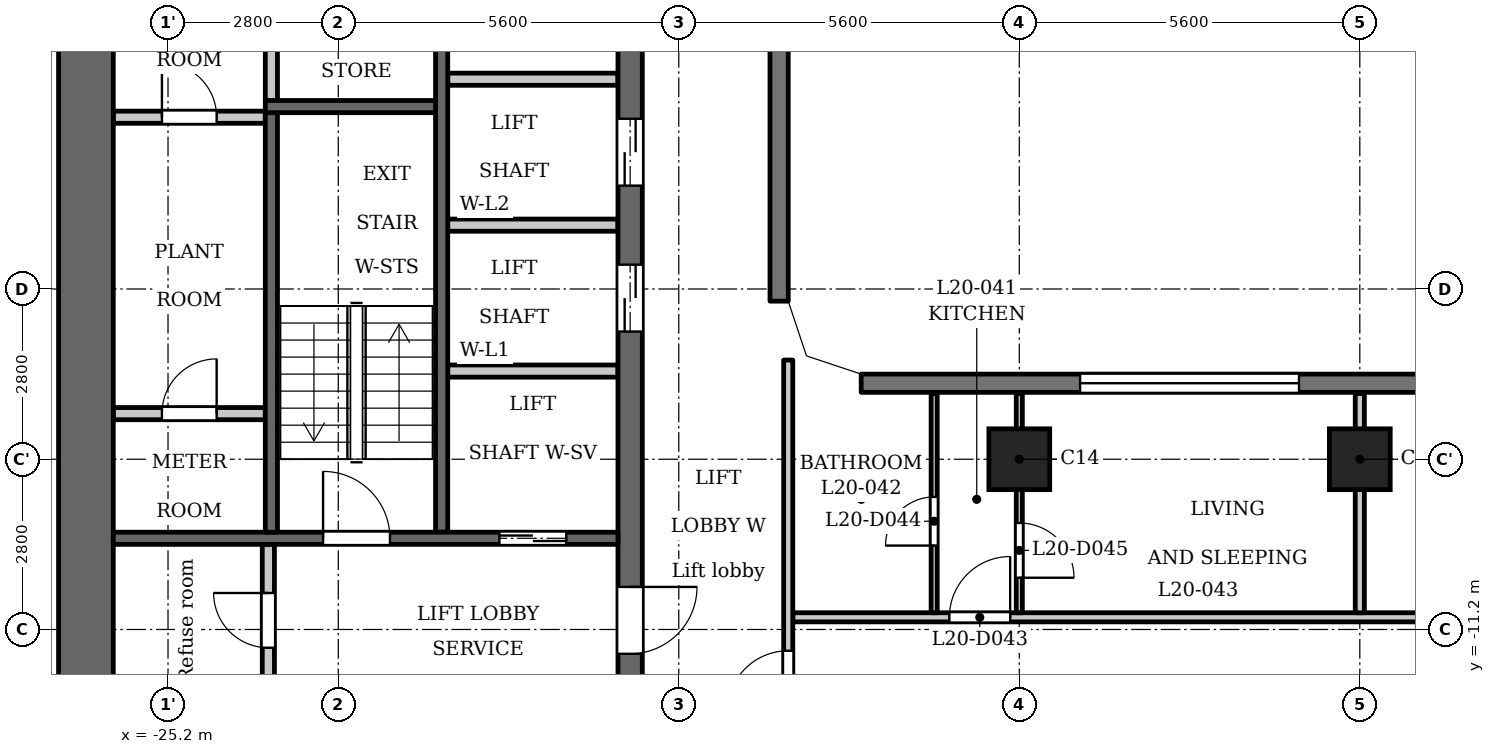
"""IFC4 building model, lengths in metres.
Left out: names, types, materials, properties, quantities, classifications, styles, units other than length and angle.
Written with IfcOpenShell. Run it as: python <this file> out.ifc"""

import sys

from ifc_helpers import new_model, si_unit, direction, frame, frame_2d, origin, origin_2d, place, context, subcontext, project, spatial, polyline, rectangle, outline, extrude, element, fill, save


model = new_model("IFC4")
c1 = context("Model", 3, precision=1e-05, world=origin(), true_north=direction((0.0, 1.0)))
c2 = subcontext(c1, "Body", "Model", "MODEL_VIEW")
j1 = project(units=[si_unit("LENGTHUNIT", "METRE"), si_unit("PLANEANGLEUNIT", "RADIAN")], contexts=[c1])
p1 = place(None, origin())
s1 = spatial("IfcSite", under=j1, at=p1, CompositionType="ELEMENT")
p2 = place(p1, origin())
s2 = spatial("IfcBuilding", under=s1, at=p2, CompositionType="ELEMENT")
p3 = place(p2, frame((0.0, 0.0, 83.3)))
s3 = spatial("IfcBuildingStorey", under=s2, at=p3, CompositionType="ELEMENT", Elevation=83.3)
for number, where, z_axis, x_axis in (
    (1, (-11.2, -8.4, 0.0), (0.0, 0.0, 1.0), (1.0, 0.0, 0.0)),
    (2, (-5.6, -8.4, 0.0), (0.0, 0.0, 1.0), (1.0, 0.0, 0.0)),
):
    element("IfcColumn", number, at=place(p3, frame(where, z_axis=z_axis, x_axis=x_axis)), inside=s3, PredefinedType="COLUMN", context=c2, shape_type="SweptSolid", body=[
        extrude(rectangle(XDim=1.0, YDim=1.0, at=origin_2d()), origin(), (0.0, 0.0, 1.0), 3.5),
    ])
p4 = place(p3, frame((-15.15, -5.8, 0.0), z_axis=(0.0, 0.0, 1.0), x_axis=(0.0, 1.0, 0.0)))
e3 = element("IfcWall", 3, at=p4, inside=s3, PredefinedType="SOLIDWALL", context=c2, shape_type="SweptSolid", body=[
    extrude(rectangle(XDim=11.6, YDim=0.3, at=frame_2d((5.8, 0.0))), origin(), (0.0, 0.0, 1.0), 3.2),
])
p5 = place(p3, frame((13.8, -7.15, 0.0), z_axis=(0.0, 0.0, 1.0), x_axis=(-1.0, 0.0, 0.0)))
e4 = element("IfcWall", 4, at=p5, inside=s3, PredefinedType="SOLIDWALL", context=c2, shape_type="SweptSolid", body=[
    extrude(rectangle(XDim=27.6, YDim=0.3, at=frame_2d((13.8, 0.0))), origin(), (0.0, 0.0, 1.0), 3.2),
])
p6 = place(p5, frame((3.6, 0.0, 1.2)))
e5 = element("IfcOpeningElement", 5, at=p6, cuts=e4, PredefinedType="OPENING", context=c2, shape_type="SweptSolid", body=[
    extrude(rectangle(XDim=3.6, YDim=0.95, at=frame_2d((1.8, 0.475))), frame((0.0, 0.16, 0.0), z_axis=(0.0, -1.0, 0.0), x_axis=(1.0, 0.0, 0.0)), (0.0, 0.0, 1.0), 0.32),
])
p7 = place(p5, frame((8.8, 0.0, 0.6)))
e6 = element("IfcOpeningElement", 6, at=p7, cuts=e4, PredefinedType="OPENING", context=c2, shape_type="SweptSolid", body=[
    extrude(rectangle(XDim=1.2, YDim=1.55, at=frame_2d((0.6, 0.775))), frame((0.0, 0.16, 0.0), z_axis=(0.0, -1.0, 0.0), x_axis=(1.0, 0.0, 0.0)), (0.0, 0.0, 1.0), 0.32),
])
p8 = place(p5, frame((11.3, 0.0, 0.9)))
e7 = element("IfcOpeningElement", 7, at=p8, cuts=e4, PredefinedType="OPENING", context=c2, shape_type="SweptSolid", body=[
    extrude(rectangle(XDim=1.8, YDim=1.25, at=frame_2d((0.9, 0.625))), frame((0.0, 0.16, 0.0), z_axis=(0.0, -1.0, 0.0), x_axis=(1.0, 0.0, 0.0)), (0.0, 0.0, 1.0), 0.32),
])
p9 = place(p5, frame((14.8, 0.0, 1.2)))
e8 = element("IfcOpeningElement", 8, at=p9, cuts=e4, PredefinedType="OPENING", context=c2, shape_type="SweptSolid", body=[
    extrude(rectangle(XDim=3.6, YDim=0.95, at=frame_2d((1.8, 0.475))), frame((0.0, 0.16, 0.0), z_axis=(0.0, -1.0, 0.0), x_axis=(1.0, 0.0, 0.0)), (0.0, 0.0, 1.0), 0.32),
])
p10 = place(p5, frame((20.4, 0.0, 1.2)))
e9 = element("IfcOpeningElement", 9, at=p10, cuts=e4, PredefinedType="OPENING", context=c2, shape_type="SweptSolid", body=[
    extrude(rectangle(XDim=3.6, YDim=0.95, at=frame_2d((1.8, 0.475))), frame((0.0, 0.16, 0.0), z_axis=(0.0, -1.0, 0.0), x_axis=(1.0, 0.0, 0.0)), (0.0, 0.0, 1.0), 0.32),
])
p11 = place(p3, frame((-23.5, -2.5, 0.0), z_axis=(0.0, 0.0, 1.0), x_axis=(0.0, 1.0, 0.0)))
e10 = element("IfcWall", 10, at=p11, inside=s3, PredefinedType="PARTITIONING", context=c2, shape_type="SweptSolid", body=[
    extrude(rectangle(XDim=2.65, YDim=0.2, at=frame_2d((1.325, 0.0))), origin(), (0.0, 0.0, 1.0), 3.2),
])
p12 = place(p3, frame((-20.7, -9.6, 0.0), z_axis=(0.0, 0.0, 1.0), x_axis=(0.0, 1.0, 0.0)))
e11 = element("IfcWall", 11, at=p12, inside=s3, PredefinedType="SHEAR", context=c2, shape_type="SweptSolid", body=[
    extrude(rectangle(XDim=9.75, YDim=0.2, at=frame_2d((4.875, 0.0))), origin(), (0.0, 0.0, 1.0), 3.2),
])
p13 = place(p3, frame((-17.6, -12.3, 0.0), z_axis=(0.0, 0.0, 1.0), x_axis=(0.0, 1.0, 0.0)))
e12 = element("IfcWall", 12, at=p13, inside=s3, PredefinedType="SHEAR", context=c2, shape_type="SweptSolid", body=[
    extrude(rectangle(XDim=24.6, YDim=0.4, at=frame_2d((12.3, 0.0))), origin(), (0.0, 0.0, 1.0), 3.2),
])
p14 = place(p13, frame((6.0, 0.0, 0.0)))
e13 = element("IfcOpeningElement", 13, at=p14, cuts=e12, PredefinedType="OPENING", context=c2, shape_type="SweptSolid", body=[
    extrude(rectangle(XDim=1.1, YDim=2.1, at=frame_2d((0.55, 1.05))), frame((0.0, 0.21, 0.0), z_axis=(0.0, -1.0, 0.0), x_axis=(1.0, 0.0, 0.0)), (0.0, 0.0, 1.0), 0.42),
])
p15 = place(p13, frame((8.4, 0.0, 0.0)))
e14 = element("IfcOpeningElement", 14, at=p15, cuts=e12, PredefinedType="OPENING", context=c2, shape_type="SweptSolid", body=[
    extrude(rectangle(XDim=1.1, YDim=2.1, at=frame_2d((0.55, 1.05))), frame((0.0, 0.21, 0.0), z_axis=(0.0, -1.0, 0.0), x_axis=(1.0, 0.0, 0.0)), (0.0, 0.0, 1.0), 0.42),
])
p16 = place(p13, frame((10.8, 0.0, 0.0)))
e15 = element("IfcOpeningElement", 15, at=p16, cuts=e12, PredefinedType="OPENING", context=c2, shape_type="SweptSolid", body=[
    extrude(rectangle(XDim=1.1, YDim=2.1, at=frame_2d((0.55, 1.05))), frame((0.0, 0.21, 0.0), z_axis=(0.0, -1.0, 0.0), x_axis=(1.0, 0.0, 0.0)), (0.0, 0.0, 1.0), 0.42),
])
p17 = place(p13, frame((16.75, 0.0, 0.0)))
e16 = element("IfcOpeningElement", 16, at=p17, cuts=e12, PredefinedType="OPENING", context=c2, shape_type="SweptSolid", body=[
    extrude(rectangle(XDim=0.9, YDim=2.1, at=frame_2d((0.45, 1.05))), frame((0.0, 0.21, 0.0), z_axis=(0.0, -1.0, 0.0), x_axis=(1.0, 0.0, 0.0)), (0.0, 0.0, 1.0), 0.42),
])
p18 = place(p13, frame((22.8, 0.0, 0.0)))
e17 = element("IfcOpeningElement", 17, at=p18, cuts=e12, PredefinedType="OPENING", context=c2, shape_type="SweptSolid", body=[
    extrude(rectangle(XDim=1.1, YDim=2.1, at=frame_2d((0.55, 1.05))), frame((0.0, 0.21, 0.0), z_axis=(0.0, -1.0, 0.0), x_axis=(1.0, 0.0, 0.0)), (0.0, 0.0, 1.0), 0.42),
])
p19 = place(p13, frame((0.7, 0.0, 0.0)))
e18 = element("IfcOpeningElement", 18, at=p19, cuts=e12, PredefinedType="OPENING", context=c2, shape_type="SweptSolid", body=[
    extrude(rectangle(XDim=1.1, YDim=2.1, at=frame_2d((0.55, 1.05))), frame((0.0, 0.21, 0.0), z_axis=(0.0, -1.0, 0.0), x_axis=(1.0, 0.0, 0.0)), (0.0, 0.0, 1.0), 0.42),
])
p20 = place(p13, frame((12.775, 0.0, 0.0)))
e19 = element("IfcOpeningElement", 19, at=p20, cuts=e12, PredefinedType="OPENING", context=c2, shape_type="SweptSolid", body=[
    extrude(rectangle(XDim=1.8, YDim=2.1, at=frame_2d((0.9, 1.05))), frame((0.0, 0.21, 0.0), z_axis=(0.0, -1.0, 0.0), x_axis=(1.0, 0.0, 0.0)), (0.0, 0.0, 1.0), 0.42),
])
p21 = place(p3, frame((-26.55, -12.3, 0.0), z_axis=(0.0, 0.0, 1.0), x_axis=(0.0, 1.0, 0.0)))
e20 = element("IfcWall", 20, at=p21, inside=s3, PredefinedType="SHEAR", context=c2, shape_type="SweptSolid", body=[
    extrude(rectangle(XDim=24.6, YDim=0.9, at=frame_2d((12.3, 0.0))), origin(), (0.0, 0.0, 1.0), 3.2),
])
p22 = place(p3, frame((-23.55, -12.3, 0.0), z_axis=(0.0, 0.0, 1.0), x_axis=(0.0, 1.0, 0.0)))
e21 = element("IfcWall", 21, at=p22, inside=s3, PredefinedType="PARTITIONING", context=c2, shape_type="SweptSolid", body=[
    extrude(rectangle(XDim=2.5, YDim=0.2, at=frame_2d((1.25, 0.0))), origin(), (0.0, 0.0, 1.0), 3.2),
])
p23 = place(p22, frame((0.8, 0.0, 0.0)))
e22 = element("IfcOpeningElement", 22, at=p23, cuts=e21, PredefinedType="OPENING", context=c2, shape_type="SweptSolid", body=[
    extrude(rectangle(XDim=0.9, YDim=2.1, at=frame_2d((0.45, 1.05))), frame((0.0, 0.11, 0.0), z_axis=(0.0, -1.0, 0.0), x_axis=(1.0, 0.0, 0.0)), (0.0, 0.0, 1.0), 0.22),
])
p24 = place(p3, frame((-23.6, -7.65, 0.0), z_axis=(0.0, 0.0, 1.0), x_axis=(-1.0, 0.0, 0.0)))
e23 = element("IfcWall", 23, at=p24, inside=s3, PredefinedType="PARTITIONING", context=c2, shape_type="SweptSolid", body=[
    extrude(rectangle(XDim=2.5, YDim=0.2, at=frame_2d((1.25, 0.0))), origin(), (0.0, 0.0, 1.0), 3.2),
])
p25 = place(p24, frame((0.8, 0.0, 0.0)))
e24 = element("IfcOpeningElement", 24, at=p25, cuts=e23, PredefinedType="OPENING", context=c2, shape_type="SweptSolid", body=[
    extrude(rectangle(XDim=0.9, YDim=2.1, at=frame_2d((0.45, 1.05))), frame((0.0, 0.11, 0.0), z_axis=(0.0, -1.0, 0.0), x_axis=(1.0, 0.0, 0.0)), (0.0, 0.0, 1.0), 0.22),
])
p26 = place(p3, frame((-23.6, -2.775, 0.0), z_axis=(0.0, 0.0, 1.0), x_axis=(-1.0, 0.0, 0.0)))
e25 = element("IfcWall", 25, at=p26, inside=s3, PredefinedType="PARTITIONING", context=c2, shape_type="SweptSolid", body=[
    extrude(rectangle(XDim=2.5, YDim=0.2, at=frame_2d((1.25, 0.0))), origin(), (0.0, 0.0, 1.0), 3.2),
])
p27 = place(p26, frame((0.8, 0.0, 0.0)))
e26 = element("IfcOpeningElement", 26, at=p27, cuts=e25, PredefinedType="OPENING", context=c2, shape_type="SweptSolid", body=[
    extrude(rectangle(XDim=0.9, YDim=2.1, at=frame_2d((0.45, 1.05))), frame((0.0, 0.11, 0.0), z_axis=(0.0, -1.0, 0.0), x_axis=(1.0, 0.0, 0.0)), (0.0, 0.0, 1.0), 0.22),
])
p28 = place(p3, frame((-17.8, -9.7, 0.0), z_axis=(0.0, 0.0, 1.0), x_axis=(-1.0, 0.0, 0.0)))
e27 = element("IfcWall", 27, at=p28, inside=s3, PredefinedType="SHEAR", context=c2, shape_type="SweptSolid", body=[
    extrude(rectangle(XDim=8.3, YDim=0.2, at=frame_2d((4.15, 0.0))), origin(), (0.0, 0.0, 1.0), 3.2),
])
p29 = place(p28, frame((0.85, 0.0, 0.0)))
e28 = element("IfcOpeningElement", 28, at=p29, cuts=e27, PredefinedType="OPENING", context=c2, shape_type="SweptSolid", body=[
    extrude(rectangle(XDim=1.1, YDim=2.1, at=frame_2d((0.55, 1.05))), frame((0.0, 0.11, 0.0), z_axis=(0.0, -1.0, 0.0), x_axis=(1.0, 0.0, 0.0)), (0.0, 0.0, 1.0), 0.22),
])
p30 = place(p28, frame((3.75, 0.0, 0.0)))
e29 = element("IfcOpeningElement", 29, at=p30, cuts=e27, PredefinedType="OPENING", context=c2, shape_type="SweptSolid", body=[
    extrude(rectangle(XDim=1.1, YDim=2.1, at=frame_2d((0.55, 1.05))), frame((0.0, 0.11, 0.0), z_axis=(0.0, -1.0, 0.0), x_axis=(1.0, 0.0, 0.0)), (0.0, 0.0, 1.0), 0.22),
])
for number, where, z_axis, x_axis in (
    (30, (-17.8, -6.95, 0.0), (0.0, 0.0, 1.0), (-1.0, 0.0, 0.0)),
    (31, (-17.8, -4.55, 0.0), (0.0, 0.0, 1.0), (-1.0, 0.0, 0.0)),
    (32, (-17.8, -2.15, 0.0), (0.0, 0.0, 1.0), (-1.0, 0.0, 0.0)),
):
    element("IfcWall", number, at=place(p3, frame(where, z_axis=z_axis, x_axis=x_axis)), inside=s3, PredefinedType="PARTITIONING", context=c2, shape_type="SweptSolid", body=[
        extrude(rectangle(XDim=2.8, YDim=0.2, at=frame_2d((1.4, 0.0))), origin(), (0.0, 0.0, 1.0), 3.2),
    ])
p31 = place(p3, frame((-23.5, -9.6, 0.0), z_axis=(0.0, 0.0, 1.0), x_axis=(0.0, 1.0, 0.0)))
e33 = element("IfcWall", 33, at=p31, inside=s3, PredefinedType="SHEAR", context=c2, shape_type="SweptSolid", body=[
    extrude(rectangle(XDim=6.9, YDim=0.2, at=frame_2d((3.45, 0.0))), origin(), (0.0, 0.0, 1.0), 3.2),
])
p32 = place(p3, frame((-20.8, -2.6, 0.0), z_axis=(0.0, 0.0, 1.0), x_axis=(-1.0, 0.0, 0.0)))
e34 = element("IfcWall", 34, at=p32, inside=s3, PredefinedType="SHEAR", context=c2, shape_type="SweptSolid", body=[
    extrude(rectangle(XDim=2.8, YDim=0.2, at=frame_2d((1.4, 0.0))), origin(), (0.0, 0.0, 1.0), 3.2),
])
p33 = place(p3, frame((-14.925, -11.0, 0.0), z_axis=(0.0, 0.0, 1.0), x_axis=(1.0, 0.0, 0.0)))
e35 = element("IfcWall", 35, at=p33, inside=s3, PredefinedType="PARTITIONING", context=c2, shape_type="SweptSolid", body=[
    extrude(rectangle(XDim=29.85, YDim=0.15, at=frame_2d((14.925, 0.0))), origin(), (0.0, 0.0, 1.0), 3.2),
])
p34 = place(p33, frame((2.575, 0.0, 0.0)))
e36 = element("IfcOpeningElement", 36, at=p34, cuts=e35, PredefinedType="OPENING", context=c2, shape_type="SweptSolid", body=[
    extrude(rectangle(XDim=1.0, YDim=2.1, at=frame_2d((0.5, 1.05))), frame((0.0, 0.085, 0.0), z_axis=(0.0, -1.0, 0.0), x_axis=(1.0, 0.0, 0.0)), (0.0, 0.0, 1.0), 0.17),
])
p35 = place(p33, frame((15.475, 0.0, 0.0)))
e37 = element("IfcOpeningElement", 37, at=p35, cuts=e35, PredefinedType="OPENING", context=c2, shape_type="SweptSolid", body=[
    extrude(rectangle(XDim=1.0, YDim=2.1, at=frame_2d((0.5, 1.05))), frame((0.0, 0.085, 0.0), z_axis=(0.0, -1.0, 0.0), x_axis=(1.0, 0.0, 0.0)), (0.0, 0.0, 1.0), 0.17),
])
p36 = place(p33, frame((26.375, 0.0, 0.0)))
e38 = element("IfcOpeningElement", 38, at=p36, cuts=e35, PredefinedType="OPENING", context=c2, shape_type="SweptSolid", body=[
    extrude(rectangle(XDim=1.0, YDim=2.1, at=frame_2d((0.5, 1.05))), frame((0.0, 0.085, 0.0), z_axis=(0.0, -1.0, 0.0), x_axis=(1.0, 0.0, 0.0)), (0.0, 0.0, 1.0), 0.17),
])
p37 = place(p3, frame((-15.0, -13.125, 0.0), z_axis=(0.0, 0.0, 1.0), x_axis=(0.0, 1.0, 0.0)))
e39 = element("IfcWall", 39, at=p37, inside=s3, PredefinedType="PARTITIONING", context=c2, shape_type="SweptSolid", body=[
    extrude(rectangle(XDim=6.356, YDim=0.15, at=frame_2d((3.178, 0.0))), origin(), (0.0, 0.0, 1.0), 3.2),
])
p38 = place(p37, frame((0.575, 0.0, 0.0)))
e40 = element("IfcOpeningElement", 40, at=p38, cuts=e39, PredefinedType="OPENING", context=c2, shape_type="SweptSolid", body=[
    extrude(rectangle(XDim=1.0, YDim=2.1, at=frame_2d((0.5, 1.05))), frame((0.0, 0.085, 0.0), z_axis=(0.0, -1.0, 0.0), x_axis=(1.0, 0.0, 0.0)), (0.0, 0.0, 1.0), 0.17),
])
p39 = place(p3, frame((-12.6, -10.925, 0.0), z_axis=(0.0, 0.0, 1.0), x_axis=(0.0, 1.0, 0.0)))
e41 = element("IfcWall", 41, at=p39, inside=s3, PredefinedType="PARTITIONING", context=c2, shape_type="SweptSolid", body=[
    extrude(rectangle(XDim=3.605, YDim=0.1, at=frame_2d((1.802, 0.0))), origin(), (0.0, 0.0, 1.0), 3.2),
])
p40 = place(p39, frame((1.105, 0.0, 0.0)))
e42 = element("IfcOpeningElement", 42, at=p40, cuts=e41, PredefinedType="OPENING", context=c2, shape_type="SweptSolid", body=[
    extrude(rectangle(XDim=0.8, YDim=2.1, at=frame_2d((0.4, 1.05))), frame((0.0, 0.06, 0.0), z_axis=(0.0, -1.0, 0.0), x_axis=(1.0, 0.0, 0.0)), (0.0, 0.0, 1.0), 0.12),
])
p41 = place(p3, frame((-11.2, -10.925, 0.0), z_axis=(0.0, 0.0, 1.0), x_axis=(0.0, 1.0, 0.0)))
e43 = element("IfcWall", 43, at=p41, inside=s3, PredefinedType="PARTITIONING", context=c2, shape_type="SweptSolid", body=[
    extrude(rectangle(XDim=3.605, YDim=0.1, at=frame_2d((1.802, 0.0))), origin(), (0.0, 0.0, 1.0), 3.2),
])
p42 = place(p41, frame((0.576, 0.0, 0.0)))
e44 = element("IfcOpeningElement", 44, at=p42, cuts=e43, PredefinedType="OPENING", context=c2, shape_type="SweptSolid", body=[
    extrude(rectangle(XDim=0.9, YDim=2.1, at=frame_2d((0.45, 1.05))), frame((0.0, 0.06, 0.0), z_axis=(0.0, -1.0, 0.0), x_axis=(1.0, 0.0, 0.0)), (0.0, 0.0, 1.0), 0.12),
])
p43 = place(p3, frame((-5.6, -10.925, 0.0), z_axis=(0.0, 0.0, 1.0), x_axis=(0.0, 1.0, 0.0)))
e45 = element("IfcWall", 45, at=p43, inside=s3, PredefinedType="PARTITIONING", context=c2, shape_type="SweptSolid", body=[
    extrude(rectangle(XDim=3.605, YDim=0.15, at=frame_2d((1.802, 0.0))), origin(), (0.0, 0.0, 1.0), 3.2),
])
p44 = place(p3, origin())
e46 = element("IfcWall", 46, at=p44, inside=s3, PredefinedType="SOLIDWALL", context=c2, shape_type="SweptSolid", body=[
    extrude(outline(polyline([(-14.937, -6.937), (-13.849, -7.3), (-13.8, -7.3), (-13.8, -7.0), (-14.7, -6.7), (-15.0, -5.8), (-15.3, -5.8), (-15.3, -5.849), (-14.937, -6.937)])), origin(), (0.0, 0.0, 1.0), 3.2),
])
p45 = place(p29, origin())
e47 = element("IfcDoor", 47, at=p45, inside=s3, OperationType="DOUBLE_DOOR_SLIDING", PredefinedType="DOOR", context=c2, shape_type="SweptSolid", body=[
    extrude(rectangle(XDim=1.1, YDim=2.1, at=frame_2d((0.55, 1.05))), frame((0.0, 0.025, 0.0), z_axis=(0.0, -1.0, 0.0), x_axis=(1.0, 0.0, 0.0)), (0.0, 0.0, 1.0), 0.05),
])
fill(e28, e47)
p46 = place(p14, origin())
e48 = element("IfcDoor", 48, at=p46, inside=s3, OperationType="DOUBLE_DOOR_SLIDING", PredefinedType="DOOR", context=c2, shape_type="SweptSolid", body=[
    extrude(rectangle(XDim=1.1, YDim=2.1, at=frame_2d((0.55, 1.05))), frame((0.0, 0.025, 0.0), z_axis=(0.0, -1.0, 0.0), x_axis=(1.0, 0.0, 0.0)), (0.0, 0.0, 1.0), 0.05),
])
fill(e13, e48)
p47 = place(p15, origin())
e49 = element("IfcDoor", 49, at=p47, inside=s3, OperationType="DOUBLE_DOOR_SLIDING", PredefinedType="DOOR", context=c2, shape_type="SweptSolid", body=[
    extrude(rectangle(XDim=1.1, YDim=2.1, at=frame_2d((0.55, 1.05))), frame((0.0, 0.025, 0.0), z_axis=(0.0, -1.0, 0.0), x_axis=(1.0, 0.0, 0.0)), (0.0, 0.0, 1.0), 0.05),
])
fill(e14, e49)
p48 = place(p19, origin())
e50 = element("IfcDoor", 50, at=p48, inside=s3, OperationType="SINGLE_SWING_RIGHT", PredefinedType="DOOR", context=c2, shape_type="SweptSolid", body=[
    extrude(rectangle(XDim=1.1, YDim=2.1, at=frame_2d((0.55, 1.05))), frame((0.0, 0.025, 0.0), z_axis=(0.0, -1.0, 0.0), x_axis=(1.0, 0.0, 0.0)), (0.0, 0.0, 1.0), 0.05),
])
fill(e18, e50)
p49 = place(p23, origin())
e51 = element("IfcDoor", 51, at=p49, inside=s3, OperationType="SINGLE_SWING_LEFT", PredefinedType="DOOR", context=c2, shape_type="SweptSolid", body=[
    extrude(rectangle(XDim=0.9, YDim=2.1, at=frame_2d((0.45, 1.05))), frame((0.0, 0.025, 0.0), z_axis=(0.0, -1.0, 0.0), x_axis=(1.0, 0.0, 0.0)), (0.0, 0.0, 1.0), 0.05),
])
fill(e22, e51)
p50 = place(p30, origin())
e52 = element("IfcDoor", 52, at=p50, inside=s3, OperationType="SINGLE_SWING_RIGHT", PredefinedType="DOOR", context=c2, shape_type="SweptSolid", body=[
    extrude(rectangle(XDim=1.1, YDim=2.1, at=frame_2d((0.55, 1.05))), frame((0.0, 0.025, 0.0), z_axis=(0.0, -1.0, 0.0), x_axis=(1.0, 0.0, 0.0)), (0.0, 0.0, 1.0), 0.05),
])
fill(e29, e52)
p51 = place(p25, origin())
e53 = element("IfcDoor", 53, at=p51, inside=s3, OperationType="SINGLE_SWING_LEFT", PredefinedType="DOOR", context=c2, shape_type="SweptSolid", body=[
    extrude(rectangle(XDim=0.9, YDim=2.1, at=frame_2d((0.45, 1.05))), frame((0.0, 0.025, 0.0), z_axis=(0.0, -1.0, 0.0), x_axis=(1.0, 0.0, 0.0)), (0.0, 0.0, 1.0), 0.05),
])
fill(e24, e53)
p52 = place(p27, origin())
e54 = element("IfcDoor", 54, at=p52, inside=s3, OperationType="SINGLE_SWING_RIGHT", PredefinedType="DOOR", context=c2, shape_type="SweptSolid", body=[
    extrude(rectangle(XDim=0.9, YDim=2.1, at=frame_2d((0.45, 1.05))), frame((0.0, 0.025, 0.0), z_axis=(0.0, -1.0, 0.0), x_axis=(1.0, 0.0, 0.0)), (0.0, 0.0, 1.0), 0.05),
])
fill(e26, e54)
p53 = place(p38, origin())
e55 = element("IfcDoor", 55, at=p53, inside=s3, OperationType="SINGLE_SWING_RIGHT", PredefinedType="DOOR", context=c2, shape_type="SweptSolid", body=[
    extrude(rectangle(XDim=1.0, YDim=2.1, at=frame_2d((0.5, 1.05))), frame((0.0, 0.025, 0.0), z_axis=(0.0, -1.0, 0.0), x_axis=(1.0, 0.0, 0.0)), (0.0, 0.0, 1.0), 0.05),
])
fill(e40, e55)
p54 = place(p34, origin())
e56 = element("IfcDoor", 56, at=p54, inside=s3, OperationType="SINGLE_SWING_LEFT", PredefinedType="DOOR", context=c2, shape_type="SweptSolid", body=[
    extrude(rectangle(XDim=1.0, YDim=2.1, at=frame_2d((0.5, 1.05))), frame((0.0, 0.025, 0.0), z_axis=(0.0, -1.0, 0.0), x_axis=(1.0, 0.0, 0.0)), (0.0, 0.0, 1.0), 0.05),
])
fill(e36, e56)
p55 = place(p40, origin())
e57 = element("IfcDoor", 57, at=p55, inside=s3, OperationType="SINGLE_SWING_RIGHT", PredefinedType="DOOR", context=c2, shape_type="SweptSolid", body=[
    extrude(rectangle(XDim=0.8, YDim=2.1, at=frame_2d((0.4, 1.05))), frame((0.0, 0.025, 0.0), z_axis=(0.0, -1.0, 0.0), x_axis=(1.0, 0.0, 0.0)), (0.0, 0.0, 1.0), 0.05),
])
fill(e42, e57)
p56 = place(p42, origin())
e58 = element("IfcDoor", 58, at=p56, inside=s3, OperationType="SINGLE_SWING_LEFT", PredefinedType="DOOR", context=c2, shape_type="SweptSolid", body=[
    extrude(rectangle(XDim=0.9, YDim=2.1, at=frame_2d((0.45, 1.05))), frame((0.0, 0.025, 0.0), z_axis=(0.0, -1.0, 0.0), x_axis=(1.0, 0.0, 0.0)), (0.0, 0.0, 1.0), 0.05),
])
fill(e44, e58)
p57 = place(p10, origin())
e59 = element("IfcWindow", 59, at=p57, inside=s3, PartitioningType="SINGLE_PANEL", PredefinedType="WINDOW", context=c2, shape_type="SweptSolid", body=[
    extrude(rectangle(XDim=3.6, YDim=0.95, at=frame_2d((1.8, 0.475))), frame((0.0, 0.03, 0.0), z_axis=(0.0, -1.0, 0.0), x_axis=(1.0, 0.0, 0.0)), (0.0, 0.0, 1.0), 0.06),
])
fill(e9, e59)
save(model, sys.argv[1])
